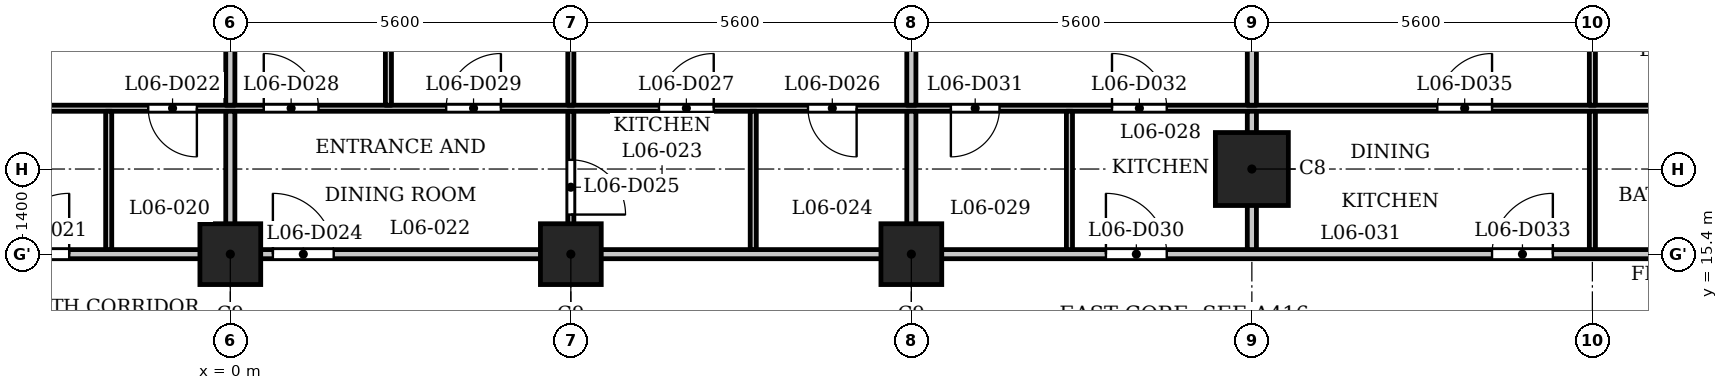
"""IFC4 building model, lengths in metres.
Left out: names, types, materials, properties, quantities, classifications, styles, units other than length and angle.
Written with IfcOpenShell. Run it as: python <this file> out.ifc"""

import sys

from ifc_helpers import new_model, si_unit, direction, frame, frame_2d, origin, origin_2d, place, context, subcontext, project, spatial, rectangle, extrude, element, fill, save


model = new_model("IFC4")
c1 = context("Model", 3, precision=1e-05, world=origin(), true_north=direction((0.0, 1.0)))
c2 = subcontext(c1, "Body", "Model", "MODEL_VIEW")
j1 = project(units=[si_unit("LENGTHUNIT", "METRE"), si_unit("PLANEANGLEUNIT", "RADIAN")], contexts=[c1])
p1 = place(None, origin())
s1 = spatial("IfcSite", under=j1, at=p1, CompositionType="ELEMENT")
p2 = place(p1, origin())
s2 = spatial("IfcBuilding", under=s1, at=p2, CompositionType="ELEMENT")
p3 = place(p2, frame((0.0, 0.0, 30.5)))
s3 = spatial("IfcBuildingStorey", under=s2, at=p3, CompositionType="ELEMENT", Elevation=30.5)
p4 = place(p3, frame((16.8, 16.8, 0.0), z_axis=(0.0, 0.0, 1.0), x_axis=(1.0, 0.0, 0.0)))
e1 = element("IfcColumn", 1, at=p4, inside=s3, PredefinedType="COLUMN", context=c2, shape_type="SweptSolid", body=[
    extrude(rectangle(XDim=1.2, YDim=1.2, at=origin_2d()), origin(), (0.0, 0.0, 1.0), 3.5),
])
for number, where, z_axis, x_axis in (
    (2, (0.0, 15.4, 0.0), (0.0, 0.0, 1.0), (1.0, 0.0, 0.0)),
    (3, (5.6, 15.4, 0.0), (0.0, 0.0, 1.0), (1.0, 0.0, 0.0)),
    (4, (11.2, 15.4, 0.0), (0.0, 0.0, 1.0), (1.0, 0.0, 0.0)),
):
    element("IfcColumn", number, at=place(p3, frame(where, z_axis=z_axis, x_axis=x_axis)), inside=s3, PredefinedType="COLUMN", context=c2, shape_type="SweptSolid", body=[
        extrude(rectangle(XDim=1.0, YDim=1.0, at=origin_2d()), origin(), (0.0, 0.0, 1.0), 3.5),
    ])
p5 = place(p3, frame((-27.484, 15.4, 0.0), z_axis=(0.0, 0.0, 1.0), x_axis=(1.0, 0.0, 0.0)))
e5 = element("IfcWall", 5, at=p5, inside=s3, PredefinedType="PARTITIONING", context=c2, shape_type="SweptSolid", body=[
    extrude(rectangle(XDim=54.968, YDim=0.15, at=frame_2d((27.484, 0.0))), origin(), (0.0, 0.0, 1.0), 3.2),
])
p6 = place(p5, frame((8.784, 0.0, 0.0)))
e6 = element("IfcOpeningElement", 6, at=p6, cuts=e5, PredefinedType="OPENING", context=c2, shape_type="SweptSolid", body=[
    extrude(rectangle(XDim=1.0, YDim=2.1, at=frame_2d((0.5, 1.05))), frame((0.0, 0.085, 0.0), z_axis=(0.0, -1.0, 0.0), x_axis=(1.0, 0.0, 0.0)), (0.0, 0.0, 1.0), 0.17),
])
p7 = place(p5, frame((14.634, 0.0, 0.0)))
e7 = element("IfcOpeningElement", 7, at=p7, cuts=e5, PredefinedType="OPENING", context=c2, shape_type="SweptSolid", body=[
    extrude(rectangle(XDim=1.0, YDim=2.1, at=frame_2d((0.5, 1.05))), frame((0.0, 0.085, 0.0), z_axis=(0.0, -1.0, 0.0), x_axis=(1.0, 0.0, 0.0)), (0.0, 0.0, 1.0), 0.17),
])
p8 = place(p5, frame((23.834, 0.0, 0.0)))
e8 = element("IfcOpeningElement", 8, at=p8, cuts=e5, PredefinedType="OPENING", context=c2, shape_type="SweptSolid", body=[
    extrude(rectangle(XDim=1.0, YDim=2.1, at=frame_2d((0.5, 1.05))), frame((0.0, 0.085, 0.0), z_axis=(0.0, -1.0, 0.0), x_axis=(1.0, 0.0, 0.0)), (0.0, 0.0, 1.0), 0.17),
])
p9 = place(p5, frame((28.184, 0.0, 0.0)))
e9 = element("IfcOpeningElement", 9, at=p9, cuts=e5, PredefinedType="OPENING", context=c2, shape_type="SweptSolid", body=[
    extrude(rectangle(XDim=1.0, YDim=2.1, at=frame_2d((0.5, 1.05))), frame((0.0, 0.085, 0.0), z_axis=(0.0, -1.0, 0.0), x_axis=(1.0, 0.0, 0.0)), (0.0, 0.0, 1.0), 0.17),
])
p10 = place(p5, frame((41.884, 0.0, 0.0)))
e10 = element("IfcOpeningElement", 10, at=p10, cuts=e5, PredefinedType="OPENING", context=c2, shape_type="SweptSolid", body=[
    extrude(rectangle(XDim=1.0, YDim=2.1, at=frame_2d((0.5, 1.05))), frame((0.0, 0.085, 0.0), z_axis=(0.0, -1.0, 0.0), x_axis=(1.0, 0.0, 0.0)), (0.0, 0.0, 1.0), 0.17),
])
p11 = place(p5, frame((48.234, 0.0, 0.0)))
e11 = element("IfcOpeningElement", 11, at=p11, cuts=e5, PredefinedType="OPENING", context=c2, shape_type="SweptSolid", body=[
    extrude(rectangle(XDim=1.0, YDim=2.1, at=frame_2d((0.5, 1.05))), frame((0.0, 0.085, 0.0), z_axis=(0.0, -1.0, 0.0), x_axis=(1.0, 0.0, 0.0)), (0.0, 0.0, 1.0), 0.17),
])
p12 = place(p3, frame((-26.732, 17.8, 0.0), z_axis=(0.0, 0.0, 1.0), x_axis=(1.0, 0.0, 0.0)))
e12 = element("IfcWall", 12, at=p12, inside=s3, PredefinedType="PARTITIONING", context=c2, shape_type="SweptSolid", body=[
    extrude(rectangle(XDim=53.126, YDim=0.1, at=frame_2d((26.563, 0.0))), origin(), (0.0, 0.0, 1.0), 3.2),
])
p13 = place(p12, frame((2.964, 0.0, 0.0)))
e13 = element("IfcOpeningElement", 13, at=p13, cuts=e12, PredefinedType="OPENING", context=c2, shape_type="SweptSolid", body=[
    extrude(rectangle(XDim=0.8, YDim=2.1, at=frame_2d((0.4, 1.05))), frame((0.0, 0.06, 0.0), z_axis=(0.0, -1.0, 0.0), x_axis=(1.0, 0.0, 0.0)), (0.0, 0.0, 1.0), 0.12),
])
p14 = place(p12, frame((7.132, 0.0, 0.0)))
e14 = element("IfcOpeningElement", 14, at=p14, cuts=e12, PredefinedType="OPENING", context=c2, shape_type="SweptSolid", body=[
    extrude(rectangle(XDim=0.9, YDim=2.1, at=frame_2d((0.45, 1.05))), frame((0.0, 0.06, 0.0), z_axis=(0.0, -1.0, 0.0), x_axis=(1.0, 0.0, 0.0)), (0.0, 0.0, 1.0), 0.12),
])
p15 = place(p12, frame((19.432, 0.0, 0.0)))
e15 = element("IfcOpeningElement", 15, at=p15, cuts=e12, PredefinedType="OPENING", context=c2, shape_type="SweptSolid", body=[
    extrude(rectangle(XDim=0.8, YDim=2.1, at=frame_2d((0.4, 1.05))), frame((0.0, 0.06, 0.0), z_axis=(0.0, -1.0, 0.0), x_axis=(1.0, 0.0, 0.0)), (0.0, 0.0, 1.0), 0.12),
])
p16 = place(p12, frame((16.732, 0.0, 0.0)))
e16 = element("IfcOpeningElement", 16, at=p16, cuts=e12, PredefinedType="OPENING", context=c2, shape_type="SweptSolid", body=[
    extrude(rectangle(XDim=0.9, YDim=2.1, at=frame_2d((0.45, 1.05))), frame((0.0, 0.06, 0.0), z_axis=(0.0, -1.0, 0.0), x_axis=(1.0, 0.0, 0.0)), (0.0, 0.0, 1.0), 0.12),
])
p17 = place(p12, frame((10.982, 0.0, 0.0)))
e17 = element("IfcOpeningElement", 17, at=p17, cuts=e12, PredefinedType="OPENING", context=c2, shape_type="SweptSolid", body=[
    extrude(rectangle(XDim=0.9, YDim=2.1, at=frame_2d((0.45, 1.05))), frame((0.0, 0.06, 0.0), z_axis=(0.0, -1.0, 0.0), x_axis=(1.0, 0.0, 0.0)), (0.0, 0.0, 1.0), 0.12),
])
p18 = place(p12, frame((12.982, 0.0, 0.0)))
e18 = element("IfcOpeningElement", 18, at=p18, cuts=e12, PredefinedType="OPENING", context=c2, shape_type="SweptSolid", body=[
    extrude(rectangle(XDim=0.9, YDim=2.1, at=frame_2d((0.45, 1.05))), frame((0.0, 0.06, 0.0), z_axis=(0.0, -1.0, 0.0), x_axis=(1.0, 0.0, 0.0)), (0.0, 0.0, 1.0), 0.12),
])
p19 = place(p12, frame((25.382, 0.0, 0.0)))
e19 = element("IfcOpeningElement", 19, at=p19, cuts=e12, PredefinedType="OPENING", context=c2, shape_type="SweptSolid", body=[
    extrude(rectangle(XDim=0.8, YDim=2.1, at=frame_2d((0.4, 1.05))), frame((0.0, 0.06, 0.0), z_axis=(0.0, -1.0, 0.0), x_axis=(1.0, 0.0, 0.0)), (0.0, 0.0, 1.0), 0.12),
])
p20 = place(p12, frame((22.182, 0.0, 0.0)))
e20 = element("IfcOpeningElement", 20, at=p20, cuts=e12, PredefinedType="OPENING", context=c2, shape_type="SweptSolid", body=[
    extrude(rectangle(XDim=0.9, YDim=2.1, at=frame_2d((0.45, 1.05))), frame((0.0, 0.06, 0.0), z_axis=(0.0, -1.0, 0.0), x_axis=(1.0, 0.0, 0.0)), (0.0, 0.0, 1.0), 0.12),
])
p21 = place(p12, frame((36.232, 0.0, 0.0)))
e21 = element("IfcOpeningElement", 21, at=p21, cuts=e12, PredefinedType="OPENING", context=c2, shape_type="SweptSolid", body=[
    extrude(rectangle(XDim=0.8, YDim=2.1, at=frame_2d((0.4, 1.05))), frame((0.0, 0.06, 0.0), z_axis=(0.0, -1.0, 0.0), x_axis=(1.0, 0.0, 0.0)), (0.0, 0.0, 1.0), 0.12),
])
p22 = place(p12, frame((33.782, 0.0, 0.0)))
e22 = element("IfcOpeningElement", 22, at=p22, cuts=e12, PredefinedType="OPENING", context=c2, shape_type="SweptSolid", body=[
    extrude(rectangle(XDim=0.9, YDim=2.1, at=frame_2d((0.45, 1.05))), frame((0.0, 0.06, 0.0), z_axis=(0.0, -1.0, 0.0), x_axis=(1.0, 0.0, 0.0)), (0.0, 0.0, 1.0), 0.12),
])
p23 = place(p12, frame((27.282, 0.0, 0.0)))
e23 = element("IfcOpeningElement", 23, at=p23, cuts=e12, PredefinedType="OPENING", context=c2, shape_type="SweptSolid", body=[
    extrude(rectangle(XDim=0.9, YDim=2.1, at=frame_2d((0.45, 1.05))), frame((0.0, 0.06, 0.0), z_axis=(0.0, -1.0, 0.0), x_axis=(1.0, 0.0, 0.0)), (0.0, 0.0, 1.0), 0.12),
])
p24 = place(p12, frame((30.282, 0.0, 0.0)))
e24 = element("IfcOpeningElement", 24, at=p24, cuts=e12, PredefinedType="OPENING", context=c2, shape_type="SweptSolid", body=[
    extrude(rectangle(XDim=0.9, YDim=2.1, at=frame_2d((0.45, 1.05))), frame((0.0, 0.06, 0.0), z_axis=(0.0, -1.0, 0.0), x_axis=(1.0, 0.0, 0.0)), (0.0, 0.0, 1.0), 0.12),
])
p25 = place(p12, frame((38.582, 0.0, 0.0)))
e25 = element("IfcOpeningElement", 25, at=p25, cuts=e12, PredefinedType="OPENING", context=c2, shape_type="SweptSolid", body=[
    extrude(rectangle(XDim=0.8, YDim=2.1, at=frame_2d((0.4, 1.05))), frame((0.0, 0.06, 0.0), z_axis=(0.0, -1.0, 0.0), x_axis=(1.0, 0.0, 0.0)), (0.0, 0.0, 1.0), 0.12),
])
p26 = place(p12, frame((41.232, 0.0, 0.0)))
e26 = element("IfcOpeningElement", 26, at=p26, cuts=e12, PredefinedType="OPENING", context=c2, shape_type="SweptSolid", body=[
    extrude(rectangle(XDim=0.9, YDim=2.1, at=frame_2d((0.45, 1.05))), frame((0.0, 0.06, 0.0), z_axis=(0.0, -1.0, 0.0), x_axis=(1.0, 0.0, 0.0)), (0.0, 0.0, 1.0), 0.12),
])
p27 = place(p12, frame((51.532, 0.0, 0.0)))
e27 = element("IfcOpeningElement", 27, at=p27, cuts=e12, PredefinedType="OPENING", context=c2, shape_type="SweptSolid", body=[
    extrude(rectangle(XDim=0.8, YDim=2.1, at=frame_2d((0.4, 1.05))), frame((0.0, 0.06, 0.0), z_axis=(0.0, -1.0, 0.0), x_axis=(1.0, 0.0, 0.0)), (0.0, 0.0, 1.0), 0.12),
])
p28 = place(p12, frame((46.582, 0.0, 0.0)))
e28 = element("IfcOpeningElement", 28, at=p28, cuts=e12, PredefinedType="OPENING", context=c2, shape_type="SweptSolid", body=[
    extrude(rectangle(XDim=0.9, YDim=2.1, at=frame_2d((0.45, 1.05))), frame((0.0, 0.06, 0.0), z_axis=(0.0, -1.0, 0.0), x_axis=(1.0, 0.0, 0.0)), (0.0, 0.0, 1.0), 0.12),
])
p29 = place(p3, frame((-2.0, 15.475, 0.0), z_axis=(0.0, 0.0, 1.0), x_axis=(0.0, 1.0, 0.0)))
e29 = element("IfcWall", 29, at=p29, inside=s3, PredefinedType="PARTITIONING", context=c2, shape_type="SweptSolid", body=[
    extrude(rectangle(XDim=2.275, YDim=0.1, at=frame_2d((1.137, 0.0))), origin(), (0.0, 0.0, 1.0), 3.2),
])
p30 = place(p3, frame((0.0, 15.475, 0.0), z_axis=(0.0, 0.0, 1.0), x_axis=(0.0, 1.0, 0.0)))
e30 = element("IfcWall", 30, at=p30, inside=s3, PredefinedType="PARTITIONING", context=c2, shape_type="SweptSolid", body=[
    extrude(rectangle(XDim=2.275, YDim=0.15, at=frame_2d((1.137, 0.0))), origin(), (0.0, 0.0, 1.0), 3.2),
])
p31 = place(p3, frame((0.0, 17.85, 0.0), z_axis=(0.0, 0.0, 1.0), x_axis=(0.0, 1.0, 0.0)))
e31 = element("IfcWall", 31, at=p31, inside=s3, PredefinedType="PARTITIONING", context=c2, shape_type="SweptSolid", body=[
    extrude(rectangle(XDim=5.28, YDim=0.15, at=frame_2d((2.64, 0.0))), origin(), (0.0, 0.0, 1.0), 3.2),
])
p32 = place(p3, frame((2.6, 17.85, 0.0), z_axis=(0.0, 0.0, 1.0), x_axis=(0.0, 1.0, 0.0)))
e32 = element("IfcWall", 32, at=p32, inside=s3, PredefinedType="PARTITIONING", context=c2, shape_type="SweptSolid", body=[
    extrude(rectangle(XDim=4.23, YDim=0.1, at=frame_2d((2.115, 0.0))), origin(), (0.0, 0.0, 1.0), 3.2),
])
p33 = place(p3, frame((5.6, 15.475, 0.0), z_axis=(0.0, 0.0, 1.0), x_axis=(0.0, 1.0, 0.0)))
e33 = element("IfcWall", 33, at=p33, inside=s3, PredefinedType="PARTITIONING", context=c2, shape_type="SweptSolid", body=[
    extrude(rectangle(XDim=2.275, YDim=0.1, at=frame_2d((1.137, 0.0))), origin(), (0.0, 0.0, 1.0), 3.2),
])
p34 = place(p33, frame((0.576, 0.0, 0.0)))
e34 = element("IfcOpeningElement", 34, at=p34, cuts=e33, PredefinedType="OPENING", context=c2, shape_type="SweptSolid", body=[
    extrude(rectangle(XDim=0.9, YDim=2.1, at=frame_2d((0.45, 1.05))), frame((0.0, 0.06, 0.0), z_axis=(0.0, -1.0, 0.0), x_axis=(1.0, 0.0, 0.0)), (0.0, 0.0, 1.0), 0.12),
])
p35 = place(p3, frame((5.6, 17.85, 0.0), z_axis=(0.0, 0.0, 1.0), x_axis=(0.0, 1.0, 0.0)))
e35 = element("IfcWall", 35, at=p35, inside=s3, PredefinedType="PARTITIONING", context=c2, shape_type="SweptSolid", body=[
    extrude(rectangle(XDim=5.28, YDim=0.1, at=frame_2d((2.64, 0.0))), origin(), (0.0, 0.0, 1.0), 3.2),
])
p36 = place(p3, frame((8.6, 15.475, 0.0), z_axis=(0.0, 0.0, 1.0), x_axis=(0.0, 1.0, 0.0)))
e36 = element("IfcWall", 36, at=p36, inside=s3, PredefinedType="PARTITIONING", context=c2, shape_type="SweptSolid", body=[
    extrude(rectangle(XDim=2.275, YDim=0.1, at=frame_2d((1.137, 0.0))), origin(), (0.0, 0.0, 1.0), 3.2),
])
p37 = place(p3, frame((11.2, 15.475, 0.0), z_axis=(0.0, 0.0, 1.0), x_axis=(0.0, 1.0, 0.0)))
e37 = element("IfcWall", 37, at=p37, inside=s3, PredefinedType="PARTITIONING", context=c2, shape_type="SweptSolid", body=[
    extrude(rectangle(XDim=2.275, YDim=0.15, at=frame_2d((1.137, 0.0))), origin(), (0.0, 0.0, 1.0), 3.2),
])
p38 = place(p3, frame((11.2, 17.85, 0.0), z_axis=(0.0, 0.0, 1.0), x_axis=(0.0, 1.0, 0.0)))
e38 = element("IfcWall", 38, at=p38, inside=s3, PredefinedType="PARTITIONING", context=c2, shape_type="SweptSolid", body=[
    extrude(rectangle(XDim=5.28, YDim=0.15, at=frame_2d((2.64, 0.0))), origin(), (0.0, 0.0, 1.0), 3.2),
])
p39 = place(p3, frame((13.8, 15.475, 0.0), z_axis=(0.0, 0.0, 1.0), x_axis=(0.0, 1.0, 0.0)))
e39 = element("IfcWall", 39, at=p39, inside=s3, PredefinedType="PARTITIONING", context=c2, shape_type="SweptSolid", body=[
    extrude(rectangle(XDim=2.275, YDim=0.1, at=frame_2d((1.137, 0.0))), origin(), (0.0, 0.0, 1.0), 3.2),
])
p40 = place(p3, frame((16.8, 15.475, 0.0), z_axis=(0.0, 0.0, 1.0), x_axis=(0.0, 1.0, 0.0)))
e40 = element("IfcWall", 40, at=p40, inside=s3, PredefinedType="PARTITIONING", context=c2, shape_type="SweptSolid", body=[
    extrude(rectangle(XDim=2.275, YDim=0.15, at=frame_2d((1.137, 0.0))), origin(), (0.0, 0.0, 1.0), 3.2),
])
p41 = place(p3, frame((16.8, 17.85, 0.0), z_axis=(0.0, 0.0, 1.0), x_axis=(0.0, 1.0, 0.0)))
e41 = element("IfcWall", 41, at=p41, inside=s3, PredefinedType="PARTITIONING", context=c2, shape_type="SweptSolid", body=[
    extrude(rectangle(XDim=5.28, YDim=0.15, at=frame_2d((2.64, 0.0))), origin(), (0.0, 0.0, 1.0), 3.2),
])
p42 = place(p3, frame((22.4, 15.475, 0.0), z_axis=(0.0, 0.0, 1.0), x_axis=(0.0, 1.0, 0.0)))
e42 = element("IfcWall", 42, at=p42, inside=s3, PredefinedType="PARTITIONING", context=c2, shape_type="SweptSolid", body=[
    extrude(rectangle(XDim=2.275, YDim=0.1, at=frame_2d((1.137, 0.0))), origin(), (0.0, 0.0, 1.0), 3.2),
])
p43 = place(p3, frame((22.4, 17.85, 0.0), z_axis=(0.0, 0.0, 1.0), x_axis=(0.0, 1.0, 0.0)))
e43 = element("IfcWall", 43, at=p43, inside=s3, PredefinedType="PARTITIONING", context=c2, shape_type="SweptSolid", body=[
    extrude(rectangle(XDim=3.87, YDim=0.1, at=frame_2d((1.935, 0.0))), origin(), (0.0, 0.0, 1.0), 3.2),
])
p44 = place(p43, frame((1.1, 0.0, 0.0)))
e44 = element("IfcOpeningElement", 44, at=p44, cuts=e43, PredefinedType="OPENING", context=c2, shape_type="SweptSolid", body=[
    extrude(rectangle(XDim=0.9, YDim=2.1, at=frame_2d((0.45, 1.05))), frame((0.0, 0.06, 0.0), z_axis=(0.0, -1.0, 0.0), x_axis=(1.0, 0.0, 0.0)), (0.0, 0.0, 1.0), 0.12),
])
p45 = place(p8, origin())
e45 = element("IfcDoor", 45, at=p45, inside=s3, OperationType="SINGLE_SWING_LEFT", PredefinedType="DOOR", context=c2, shape_type="SweptSolid", body=[
    extrude(rectangle(XDim=1.0, YDim=2.1, at=frame_2d((0.5, 1.05))), frame((0.0, 0.025, 0.0), z_axis=(0.0, -1.0, 0.0), x_axis=(1.0, 0.0, 0.0)), (0.0, 0.0, 1.0), 0.05),
])
fill(e8, e45)
p46 = place(p19, origin())
e46 = element("IfcDoor", 46, at=p46, inside=s3, OperationType="SINGLE_SWING_RIGHT", PredefinedType="DOOR", context=c2, shape_type="SweptSolid", body=[
    extrude(rectangle(XDim=0.8, YDim=2.1, at=frame_2d((0.4, 1.05))), frame((0.0, 0.025, 0.0), z_axis=(0.0, -1.0, 0.0), x_axis=(1.0, 0.0, 0.0)), (0.0, 0.0, 1.0), 0.05),
])
fill(e19, e46)
p47 = place(p9, origin())
e47 = element("IfcDoor", 47, at=p47, inside=s3, OperationType="SINGLE_SWING_RIGHT", PredefinedType="DOOR", context=c2, shape_type="SweptSolid", body=[
    extrude(rectangle(XDim=1.0, YDim=2.1, at=frame_2d((0.5, 1.05))), frame((0.0, 0.025, 0.0), z_axis=(0.0, -1.0, 0.0), x_axis=(1.0, 0.0, 0.0)), (0.0, 0.0, 1.0), 0.05),
])
fill(e9, e47)
p48 = place(p34, origin())
e48 = element("IfcDoor", 48, at=p48, inside=s3, OperationType="SINGLE_SWING_LEFT", PredefinedType="DOOR", context=c2, shape_type="SweptSolid", body=[
    extrude(rectangle(XDim=0.9, YDim=2.1, at=frame_2d((0.45, 1.05))), frame((0.0, 0.025, 0.0), z_axis=(0.0, -1.0, 0.0), x_axis=(1.0, 0.0, 0.0)), (0.0, 0.0, 1.0), 0.05),
])
fill(e34, e48)
p49 = place(p21, origin())
e49 = element("IfcDoor", 49, at=p49, inside=s3, OperationType="SINGLE_SWING_RIGHT", PredefinedType="DOOR", context=c2, shape_type="SweptSolid", body=[
    extrude(rectangle(XDim=0.8, YDim=2.1, at=frame_2d((0.4, 1.05))), frame((0.0, 0.025, 0.0), z_axis=(0.0, -1.0, 0.0), x_axis=(1.0, 0.0, 0.0)), (0.0, 0.0, 1.0), 0.05),
])
fill(e21, e49)
p50 = place(p22, origin())
e50 = element("IfcDoor", 50, at=p50, inside=s3, OperationType="SINGLE_SWING_LEFT", PredefinedType="DOOR", context=c2, shape_type="SweptSolid", body=[
    extrude(rectangle(XDim=0.9, YDim=2.1, at=frame_2d((0.45, 1.05))), frame((0.0, 0.025, 0.0), z_axis=(0.0, -1.0, 0.0), x_axis=(1.0, 0.0, 0.0)), (0.0, 0.0, 1.0), 0.05),
])
fill(e22, e50)
p51 = place(p23, origin())
e51 = element("IfcDoor", 51, at=p51, inside=s3, OperationType="SINGLE_SWING_RIGHT", PredefinedType="DOOR", context=c2, shape_type="SweptSolid", body=[
    extrude(rectangle(XDim=0.9, YDim=2.1, at=frame_2d((0.45, 1.05))), frame((0.0, 0.025, 0.0), z_axis=(0.0, -1.0, 0.0), x_axis=(1.0, 0.0, 0.0)), (0.0, 0.0, 1.0), 0.05),
])
fill(e23, e51)
p52 = place(p24, origin())
e52 = element("IfcDoor", 52, at=p52, inside=s3, OperationType="SINGLE_SWING_LEFT", PredefinedType="DOOR", context=c2, shape_type="SweptSolid", body=[
    extrude(rectangle(XDim=0.9, YDim=2.1, at=frame_2d((0.45, 1.05))), frame((0.0, 0.025, 0.0), z_axis=(0.0, -1.0, 0.0), x_axis=(1.0, 0.0, 0.0)), (0.0, 0.0, 1.0), 0.05),
])
fill(e24, e52)
p53 = place(p10, origin())
e53 = element("IfcDoor", 53, at=p53, inside=s3, OperationType="SINGLE_SWING_RIGHT", PredefinedType="DOOR", context=c2, shape_type="SweptSolid", body=[
    extrude(rectangle(XDim=1.0, YDim=2.1, at=frame_2d((0.5, 1.05))), frame((0.0, 0.025, 0.0), z_axis=(0.0, -1.0, 0.0), x_axis=(1.0, 0.0, 0.0)), (0.0, 0.0, 1.0), 0.05),
])
fill(e10, e53)
p54 = place(p25, origin())
e54 = element("IfcDoor", 54, at=p54, inside=s3, OperationType="SINGLE_SWING_LEFT", PredefinedType="DOOR", context=c2, shape_type="SweptSolid", body=[
    extrude(rectangle(XDim=0.8, YDim=2.1, at=frame_2d((0.4, 1.05))), frame((0.0, 0.025, 0.0), z_axis=(0.0, -1.0, 0.0), x_axis=(1.0, 0.0, 0.0)), (0.0, 0.0, 1.0), 0.05),
])
fill(e25, e54)
p55 = place(p26, origin())
e55 = element("IfcDoor", 55, at=p55, inside=s3, OperationType="SINGLE_SWING_RIGHT", PredefinedType="DOOR", context=c2, shape_type="SweptSolid", body=[
    extrude(rectangle(XDim=0.9, YDim=2.1, at=frame_2d((0.45, 1.05))), frame((0.0, 0.025, 0.0), z_axis=(0.0, -1.0, 0.0), x_axis=(1.0, 0.0, 0.0)), (0.0, 0.0, 1.0), 0.05),
])
fill(e26, e55)
p56 = place(p11, origin())
e56 = element("IfcDoor", 56, at=p56, inside=s3, OperationType="SINGLE_SWING_LEFT", PredefinedType="DOOR", context=c2, shape_type="SweptSolid", body=[
    extrude(rectangle(XDim=1.0, YDim=2.1, at=frame_2d((0.5, 1.05))), frame((0.0, 0.025, 0.0), z_axis=(0.0, -1.0, 0.0), x_axis=(1.0, 0.0, 0.0)), (0.0, 0.0, 1.0), 0.05),
])
fill(e11, e56)
p57 = place(p28, origin())
e57 = element("IfcDoor", 57, at=p57, inside=s3, OperationType="SINGLE_SWING_LEFT", PredefinedType="DOOR", context=c2, shape_type="SweptSolid", body=[
    extrude(rectangle(XDim=0.9, YDim=2.1, at=frame_2d((0.45, 1.05))), frame((0.0, 0.025, 0.0), z_axis=(0.0, -1.0, 0.0), x_axis=(1.0, 0.0, 0.0)), (0.0, 0.0, 1.0), 0.05),
])
fill(e28, e57)
save(model, sys.argv[1])
